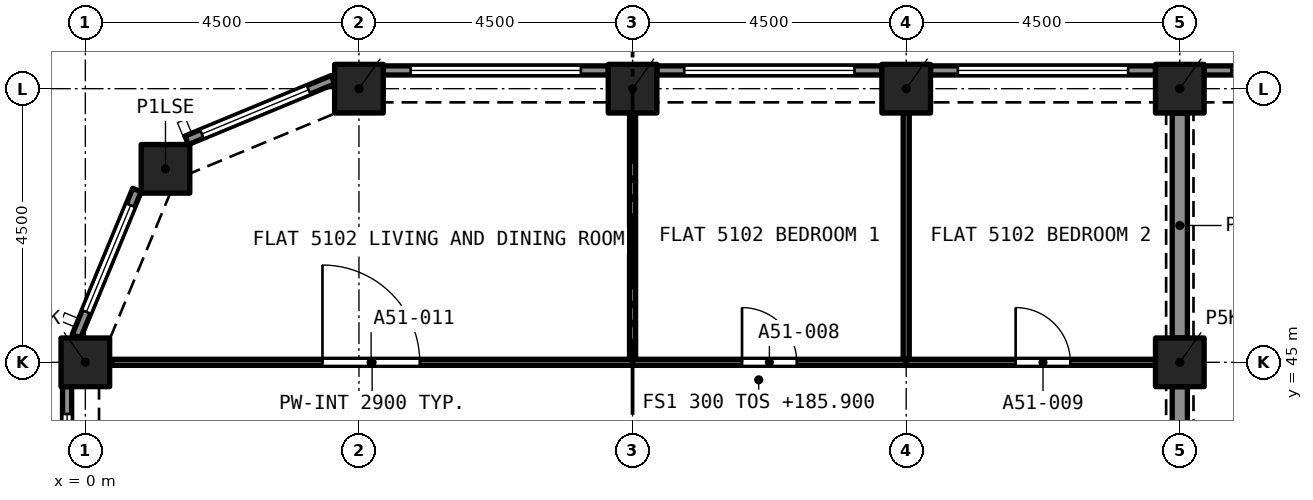
"""IFC4 building model, lengths in metres.
Left out: names, types, materials, properties, quantities, classifications, styles, units other than length and angle.
Written with IfcOpenShell. Run it as: python <this file> out.ifc"""

import sys

from ifc_helpers import new_model, si_unit, direction, frame, frame_2d, origin, origin_2d, place, context, subcontext, project, spatial, rectangle, extrude, element, fill, save


model = new_model("IFC4")
c1 = context("Model", 3, precision=1e-05, world=origin(), true_north=direction((0.0, 1.0)))
c2 = subcontext(c1, "Body", "Model", "MODEL_VIEW")
j1 = project(units=[si_unit("LENGTHUNIT", "METRE"), si_unit("PLANEANGLEUNIT", "RADIAN")], contexts=[c1])
p1 = place(None, origin())
s1 = spatial("IfcSite", under=j1, at=p1, CompositionType="ELEMENT")
p2 = place(p1, origin())
s2 = spatial("IfcBuilding", under=s1, at=p2, CompositionType="ELEMENT")
p3 = place(p2, frame((0.0, 0.0, 185.9)))
s3 = spatial("IfcBuildingStorey", under=s2, at=p3, CompositionType="ELEMENT", Elevation=185.9)
for number, where, z_axis, x_axis in (
    (1, (0.0, 45.0, 0.0), (0.0, 0.0, 1.0), (1.0, 0.0, 0.0)),
    (2, (18.0, 45.0, 0.0), (0.0, 0.0, 1.0), (1.0, 0.0, 0.0)),
    (3, (1.318, 48.182, 0.0), (0.0, 0.0, 1.0), (1.0, 0.0, 0.0)),
    (4, (4.5, 49.5, 0.0), (0.0, 0.0, 1.0), (1.0, 0.0, 0.0)),
    (5, (9.0, 49.5, 0.0), (0.0, 0.0, 1.0), (1.0, 0.0, 0.0)),
    (6, (13.5, 49.5, 0.0), (0.0, 0.0, 1.0), (1.0, 0.0, 0.0)),
    (7, (18.0, 49.5, 0.0), (0.0, 0.0, 1.0), (1.0, 0.0, 0.0)),
):
    element("IfcColumn", number, at=place(p3, frame(where, z_axis=z_axis, x_axis=x_axis)), inside=s3, PredefinedType="COLUMN", context=c2, shape_type="SweptSolid", body=[
        extrude(rectangle(XDim=0.8, YDim=0.8, at=origin_2d()), origin(), (0.0, 0.0, 1.0), 3.2),
    ])
p4 = place(p3, frame((18.4, 49.8, 0.0), z_axis=(0.0, 0.0, 1.0), x_axis=(1.0, 0.0, 0.0)))
e8 = element("IfcWall", 8, at=p4, inside=s3, PredefinedType="SOLIDWALL", context=c2, shape_type="SweptSolid", body=[
    extrude(rectangle(XDim=3.7, YDim=0.15, at=frame_2d((1.85, 0.0))), origin(), (0.0, 0.0, 1.0), 3.2),
])
p5 = place(p4, frame((0.45, 0.0, 0.45)))
e9 = element("IfcOpeningElement", 9, at=p5, cuts=e8, PredefinedType="OPENING", context=c2, shape_type="SweptSolid", body=[
    extrude(rectangle(XDim=2.8, YDim=1.95, at=frame_2d((1.4, 0.975))), frame((0.0, 0.085, 0.0), z_axis=(0.0, -1.0, 0.0), x_axis=(1.0, 0.0, 0.0)), (0.0, 0.0, 1.0), 0.17),
])
p6 = place(p3, frame((13.9, 49.8, 0.0), z_axis=(0.0, 0.0, 1.0), x_axis=(1.0, 0.0, 0.0)))
e10 = element("IfcWall", 10, at=p6, inside=s3, PredefinedType="SOLIDWALL", context=c2, shape_type="SweptSolid", body=[
    extrude(rectangle(XDim=3.7, YDim=0.15, at=frame_2d((1.85, 0.0))), origin(), (0.0, 0.0, 1.0), 3.2),
])
p7 = place(p6, frame((0.45, 0.0, 0.45)))
e11 = element("IfcOpeningElement", 11, at=p7, cuts=e10, PredefinedType="OPENING", context=c2, shape_type="SweptSolid", body=[
    extrude(rectangle(XDim=2.8, YDim=1.95, at=frame_2d((1.4, 0.975))), frame((0.0, 0.085, 0.0), z_axis=(0.0, -1.0, 0.0), x_axis=(1.0, 0.0, 0.0)), (0.0, 0.0, 1.0), 0.17),
])
p8 = place(p3, frame((9.4, 49.8, 0.0), z_axis=(0.0, 0.0, 1.0), x_axis=(1.0, 0.0, 0.0)))
e12 = element("IfcWall", 12, at=p8, inside=s3, PredefinedType="SOLIDWALL", context=c2, shape_type="SweptSolid", body=[
    extrude(rectangle(XDim=3.7, YDim=0.15, at=frame_2d((1.85, 0.0))), origin(), (0.0, 0.0, 1.0), 3.2),
])
p9 = place(p8, frame((0.45, 0.0, 0.45)))
e13 = element("IfcOpeningElement", 13, at=p9, cuts=e12, PredefinedType="OPENING", context=c2, shape_type="SweptSolid", body=[
    extrude(rectangle(XDim=2.8, YDim=1.95, at=frame_2d((1.4, 0.975))), frame((0.0, 0.085, 0.0), z_axis=(0.0, -1.0, 0.0), x_axis=(1.0, 0.0, 0.0)), (0.0, 0.0, 1.0), 0.17),
])
p10 = place(p3, frame((4.9, 49.8, 0.0), z_axis=(0.0, 0.0, 1.0), x_axis=(1.0, 0.0, 0.0)))
e14 = element("IfcWall", 14, at=p10, inside=s3, PredefinedType="SOLIDWALL", context=c2, shape_type="SweptSolid", body=[
    extrude(rectangle(XDim=3.7, YDim=0.15, at=frame_2d((1.85, 0.0))), origin(), (0.0, 0.0, 1.0), 3.2),
])
p11 = place(p10, frame((0.45, 0.0, 0.45)))
e15 = element("IfcOpeningElement", 15, at=p11, cuts=e14, PredefinedType="OPENING", context=c2, shape_type="SweptSolid", body=[
    extrude(rectangle(XDim=2.8, YDim=1.95, at=frame_2d((1.4, 0.975))), frame((0.0, 0.085, 0.0), z_axis=(0.0, -1.0, 0.0), x_axis=(1.0, 0.0, 0.0)), (0.0, 0.0, 1.0), 0.17),
])
p12 = place(p3, frame((1.667, 48.651, 0.0), z_axis=(0.0, 0.0, 1.0), x_axis=(0.923885342263, 0.382669406082, 0.0)))
e16 = element("IfcWall", 16, at=p12, inside=s3, PredefinedType="SOLIDWALL", context=c2, shape_type="SweptSolid", body=[
    extrude(rectangle(XDim=2.602, YDim=0.15, at=frame_2d((1.301, 0.0))), origin(), (0.0, 0.0, 1.0), 3.2),
])
p13 = place(p12, frame((0.27, 0.0, 0.45)))
e17 = element("IfcOpeningElement", 17, at=p13, cuts=e16, PredefinedType="OPENING", context=c2, shape_type="SweptSolid", body=[
    extrude(rectangle(XDim=1.9, YDim=1.95, at=frame_2d((0.95, 0.975))), frame((0.0, 0.085, 0.0), z_axis=(0.0, -1.0, 0.0), x_axis=(1.0, 0.0, 0.0)), (0.0, 0.0, 1.0), 0.17),
])
p14 = place(p3, frame((-0.147, 45.429, 0.0), z_axis=(0.0, 0.0, 1.0), x_axis=(0.382669406082, 0.923885342263, 0.0)))
e18 = element("IfcWall", 18, at=p14, inside=s3, PredefinedType="SOLIDWALL", context=c2, shape_type="SweptSolid", body=[
    extrude(rectangle(XDim=2.602, YDim=0.15, at=frame_2d((1.301, 0.0))), origin(), (0.0, 0.0, 1.0), 3.2),
])
p15 = place(p14, frame((0.432, 0.0, 0.45)))
e19 = element("IfcOpeningElement", 19, at=p15, cuts=e18, PredefinedType="OPENING", context=c2, shape_type="SweptSolid", body=[
    extrude(rectangle(XDim=1.9, YDim=1.95, at=frame_2d((0.95, 0.975))), frame((0.0, 0.085, 0.0), z_axis=(0.0, -1.0, 0.0), x_axis=(1.0, 0.0, 0.0)), (0.0, 0.0, 1.0), 0.17),
])
p16 = place(p3, frame((-0.3, 40.9, 0.0), z_axis=(0.0, 0.0, 1.0), x_axis=(0.0, 1.0, 0.0)))
e20 = element("IfcWall", 20, at=p16, inside=s3, PredefinedType="SOLIDWALL", context=c2, shape_type="SweptSolid", body=[
    extrude(rectangle(XDim=3.7, YDim=0.15, at=frame_2d((1.85, 0.0))), origin(), (0.0, 0.0, 1.0), 3.2),
])
p17 = place(p16, frame((0.45, 0.0, 0.45)))
e21 = element("IfcOpeningElement", 21, at=p17, cuts=e20, PredefinedType="OPENING", context=c2, shape_type="SweptSolid", body=[
    extrude(rectangle(XDim=2.8, YDim=1.95, at=frame_2d((1.4, 0.975))), frame((0.0, 0.085, 0.0), z_axis=(0.0, -1.0, 0.0), x_axis=(1.0, 0.0, 0.0)), (0.0, 0.0, 1.0), 0.17),
])
p18 = place(p3, frame((13.5, 45.05, 0.0), z_axis=(0.0, 0.0, 1.0), x_axis=(0.0, 1.0, 0.0)))
e22 = element("IfcWall", 22, at=p18, inside=s3, PredefinedType="PARTITIONING", context=c2, shape_type="SweptSolid", body=[
    extrude(rectangle(XDim=4.05, YDim=0.1, at=frame_2d((2.025, 0.0))), origin(), (0.0, 0.0, 1.0), 2.9),
])
p19 = place(p3, frame((9.0, 45.0, 0.0), z_axis=(0.0, 0.0, 1.0), x_axis=(1.0, 0.0, 0.0)))
e23 = element("IfcWall", 23, at=p19, inside=s3, PredefinedType="PARTITIONING", context=c2, shape_type="SweptSolid", body=[
    extrude(rectangle(XDim=4.5, YDim=0.1, at=frame_2d((2.25, 0.0))), origin(), (0.0, 0.0, 1.0), 2.9),
])
p20 = place(p19, frame((1.8, 0.0, 0.0)))
e24 = element("IfcOpeningElement", 24, at=p20, cuts=e23, PredefinedType="OPENING", context=c2, shape_type="SweptSolid", body=[
    extrude(rectangle(XDim=0.9, YDim=2.1, at=frame_2d((0.45, 1.05))), frame((0.0, 0.06, 0.0), z_axis=(0.0, -1.0, 0.0), x_axis=(1.0, 0.0, 0.0)), (0.0, 0.0, 1.0), 0.12),
])
p21 = place(p3, frame((9.0, 45.05, 0.0), z_axis=(0.0, 0.0, 1.0), x_axis=(0.0, 1.0, 0.0)))
e25 = element("IfcWall", 25, at=p21, inside=s3, PredefinedType="PARTITIONING", context=c2, shape_type="SweptSolid", body=[
    extrude(rectangle(XDim=4.05, YDim=0.1, at=frame_2d((2.025, 0.0))), origin(), (0.0, 0.0, 1.0), 2.9),
])
p22 = place(p3, frame((13.5, 45.0, 0.0), z_axis=(0.0, 0.0, 1.0), x_axis=(1.0, 0.0, 0.0)))
e26 = element("IfcWall", 26, at=p22, inside=s3, PredefinedType="PARTITIONING", context=c2, shape_type="SweptSolid", body=[
    extrude(rectangle(XDim=4.1, YDim=0.1, at=frame_2d((2.05, 0.0))), origin(), (0.0, 0.0, 1.0), 2.9),
])
p23 = place(p22, frame((1.8, 0.0, 0.0)))
e27 = element("IfcOpeningElement", 27, at=p23, cuts=e26, PredefinedType="OPENING", context=c2, shape_type="SweptSolid", body=[
    extrude(rectangle(XDim=0.9, YDim=2.1, at=frame_2d((0.45, 1.05))), frame((0.0, 0.06, 0.0), z_axis=(0.0, -1.0, 0.0), x_axis=(1.0, 0.0, 0.0)), (0.0, 0.0, 1.0), 0.12),
])
p24 = place(p3, frame((18.0, 45.4, 0.0), z_axis=(0.0, 0.0, 1.0), x_axis=(0.0, 1.0, 0.0)))
e28 = element("IfcWall", 28, at=p24, inside=s3, PredefinedType="PARTITIONING", context=c2, shape_type="SweptSolid", body=[
    extrude(rectangle(XDim=3.7, YDim=0.25, at=frame_2d((1.85, 0.0))), origin(), (0.0, 0.0, 1.0), 2.38),
])
p25 = place(p3, frame((0.433, 45.0, 0.0), z_axis=(0.0, 0.0, 1.0), x_axis=(1.0, 0.0, 0.0)))
e29 = element("IfcWall", 29, at=p25, inside=s3, PredefinedType="PARTITIONING", context=c2, shape_type="SweptSolid", body=[
    extrude(rectangle(XDim=8.567, YDim=0.1, at=frame_2d((4.284, 0.0))), origin(), (0.0, 0.0, 1.0), 2.9),
])
p26 = place(p25, frame((3.467, 0.0, 0.0)))
e30 = element("IfcOpeningElement", 30, at=p26, cuts=e29, PredefinedType="OPENING", context=c2, shape_type="SweptSolid", body=[
    extrude(rectangle(XDim=1.6, YDim=2.1, at=frame_2d((0.8, 1.05))), frame((0.0, 0.06, 0.0), z_axis=(0.0, -1.0, 0.0), x_axis=(1.0, 0.0, 0.0)), (0.0, 0.0, 1.0), 0.12),
])
p27 = place(p3, frame((18.0, 40.9, 0.0), z_axis=(0.0, 0.0, 1.0), x_axis=(0.0, 1.0, 0.0)))
e31 = element("IfcWall", 31, at=p27, inside=s3, PredefinedType="PARTITIONING", context=c2, shape_type="SweptSolid", body=[
    extrude(rectangle(XDim=3.7, YDim=0.25, at=frame_2d((1.85, 0.0))), origin(), (0.0, 0.0, 1.0), 2.38),
])
p28 = place(p5, origin())
e32 = element("IfcWindow", 32, at=p28, inside=s3, PartitioningType="SINGLE_PANEL", PredefinedType="WINDOW", context=c2, shape_type="SweptSolid", body=[
    extrude(rectangle(XDim=2.8, YDim=1.95, at=frame_2d((1.4, 0.975))), frame((0.0, 0.03, 0.0), z_axis=(0.0, -1.0, 0.0), x_axis=(1.0, 0.0, 0.0)), (0.0, 0.0, 1.0), 0.06),
])
fill(e9, e32)
p29 = place(p7, origin())
e33 = element("IfcWindow", 33, at=p29, inside=s3, PartitioningType="SINGLE_PANEL", PredefinedType="WINDOW", context=c2, shape_type="SweptSolid", body=[
    extrude(rectangle(XDim=2.8, YDim=1.95, at=frame_2d((1.4, 0.975))), frame((0.0, 0.03, 0.0), z_axis=(0.0, -1.0, 0.0), x_axis=(1.0, 0.0, 0.0)), (0.0, 0.0, 1.0), 0.06),
])
fill(e11, e33)
p30 = place(p9, origin())
e34 = element("IfcWindow", 34, at=p30, inside=s3, PartitioningType="SINGLE_PANEL", PredefinedType="WINDOW", context=c2, shape_type="SweptSolid", body=[
    extrude(rectangle(XDim=2.8, YDim=1.95, at=frame_2d((1.4, 0.975))), frame((0.0, 0.03, 0.0), z_axis=(0.0, -1.0, 0.0), x_axis=(1.0, 0.0, 0.0)), (0.0, 0.0, 1.0), 0.06),
])
fill(e13, e34)
p31 = place(p11, origin())
e35 = element("IfcWindow", 35, at=p31, inside=s3, PartitioningType="SINGLE_PANEL", PredefinedType="WINDOW", context=c2, shape_type="SweptSolid", body=[
    extrude(rectangle(XDim=2.8, YDim=1.95, at=frame_2d((1.4, 0.975))), frame((0.0, 0.03, 0.0), z_axis=(0.0, -1.0, 0.0), x_axis=(1.0, 0.0, 0.0)), (0.0, 0.0, 1.0), 0.06),
])
fill(e15, e35)
p32 = place(p13, origin())
e36 = element("IfcWindow", 36, at=p32, inside=s3, PartitioningType="SINGLE_PANEL", PredefinedType="WINDOW", context=c2, shape_type="SweptSolid", body=[
    extrude(rectangle(XDim=1.9, YDim=1.95, at=frame_2d((0.95, 0.975))), frame((0.0, 0.03, 0.0), z_axis=(0.0, -1.0, 0.0), x_axis=(1.0, 0.0, 0.0)), (0.0, 0.0, 1.0), 0.06),
])
fill(e17, e36)
p33 = place(p15, origin())
e37 = element("IfcWindow", 37, at=p33, inside=s3, PartitioningType="SINGLE_PANEL", PredefinedType="WINDOW", context=c2, shape_type="SweptSolid", body=[
    extrude(rectangle(XDim=1.9, YDim=1.95, at=frame_2d((0.95, 0.975))), frame((0.0, 0.03, 0.0), z_axis=(0.0, -1.0, 0.0), x_axis=(1.0, 0.0, 0.0)), (0.0, 0.0, 1.0), 0.06),
])
fill(e19, e37)
p34 = place(p17, origin())
e38 = element("IfcWindow", 38, at=p34, inside=s3, PartitioningType="SINGLE_PANEL", PredefinedType="WINDOW", context=c2, shape_type="SweptSolid", body=[
    extrude(rectangle(XDim=2.8, YDim=1.95, at=frame_2d((1.4, 0.975))), frame((0.0, 0.03, 0.0), z_axis=(0.0, -1.0, 0.0), x_axis=(1.0, 0.0, 0.0)), (0.0, 0.0, 1.0), 0.06),
])
fill(e21, e38)
p35 = place(p20, origin())
e39 = element("IfcDoor", 39, at=p35, inside=s3, OperationType="SINGLE_SWING_LEFT", PredefinedType="DOOR", context=c2, shape_type="SweptSolid", body=[
    extrude(rectangle(XDim=0.9, YDim=2.1, at=frame_2d((0.45, 1.05))), frame((0.0, 0.025, 0.0), z_axis=(0.0, -1.0, 0.0), x_axis=(1.0, 0.0, 0.0)), (0.0, 0.0, 1.0), 0.05),
])
fill(e24, e39)
p36 = place(p23, origin())
e40 = element("IfcDoor", 40, at=p36, inside=s3, OperationType="SINGLE_SWING_RIGHT", PredefinedType="DOOR", context=c2, shape_type="SweptSolid", body=[
    extrude(rectangle(XDim=0.9, YDim=2.1, at=frame_2d((0.45, 1.05))), frame((0.0, 0.025, 0.0), z_axis=(0.0, -1.0, 0.0), x_axis=(1.0, 0.0, 0.0)), (0.0, 0.0, 1.0), 0.05),
])
fill(e27, e40)
p37 = place(p26, origin())
e41 = element("IfcDoor", 41, at=p37, inside=s3, OperationType="SINGLE_SWING_LEFT", PredefinedType="DOOR", context=c2, shape_type="SweptSolid", body=[
    extrude(rectangle(XDim=1.6, YDim=2.1, at=frame_2d((0.8, 1.05))), frame((0.0, 0.025, 0.0), z_axis=(0.0, -1.0, 0.0), x_axis=(1.0, 0.0, 0.0)), (0.0, 0.0, 1.0), 0.05),
])
fill(e30, e41)
save(model, sys.argv[1])
